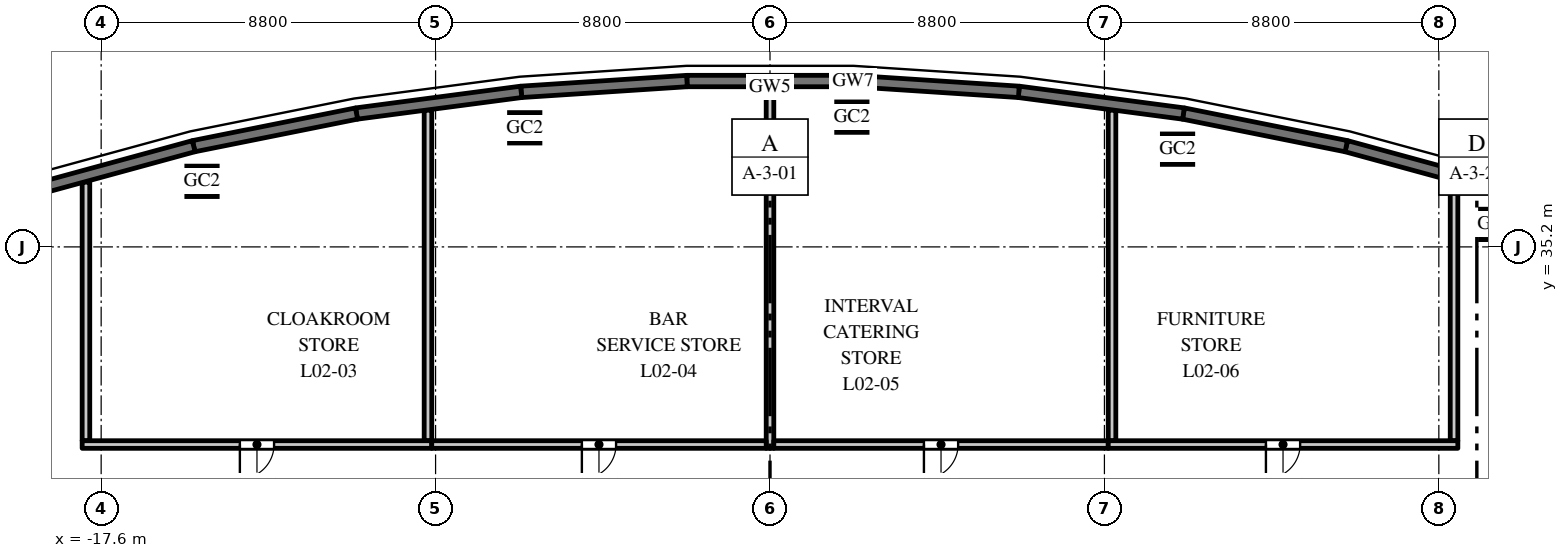
"""IFC4 building model, lengths in metres.
Left out: names, types, materials, properties, quantities, classifications, styles, units other than length and angle.
Written with IfcOpenShell. Run it as: python <this file> out.ifc"""

import sys

from ifc_helpers import new_model, si_unit, direction, frame, frame_2d, origin, origin_2d, place, context, subcontext, project, spatial, rectangle, hollow_rectangle, extrude, element, fill, save


model = new_model("IFC4")
c1 = context("Model", 3, precision=1e-05, world=origin(), true_north=direction((0.0, 1.0)))
c2 = subcontext(c1, "Body", "Model", "MODEL_VIEW")
j1 = project(units=[si_unit("LENGTHUNIT", "METRE"), si_unit("PLANEANGLEUNIT", "RADIAN")], contexts=[c1])
p1 = place(None, origin())
s1 = spatial("IfcSite", under=j1, at=p1, CompositionType="ELEMENT")
p2 = place(p1, origin())
s2 = spatial("IfcBuilding", under=s1, at=p2, CompositionType="ELEMENT")
p3 = place(p2, frame((0.0, 0.0, 13.5)))
s3 = spatial("IfcBuildingStorey", under=s2, at=p3, CompositionType="ELEMENT", Elevation=13.5)
for number, where, z_axis, x_axis in (
    (1, (19.097, 35.792, 0.0), (0.0, 0.0, 1.0), (1.0, 0.0, 0.0)),
    (2, (10.725, 37.771, 0.0), (0.0, 0.0, 1.0), (1.0, 0.0, 0.0)),
    (3, (2.155, 38.614, 0.0), (0.0, 0.0, 1.0), (1.0, 0.0, 0.0)),
    (4, (-6.454, 38.333, 0.0), (0.0, 0.0, 1.0), (1.0, 0.0, 0.0)),
    (5, (-14.946, 36.925, 0.0), (0.0, 0.0, 1.0), (1.0, 0.0, 0.0)),
):
    element("IfcColumn", number, at=place(p3, frame(where, z_axis=z_axis, x_axis=x_axis)), inside=s3, PredefinedType="COLUMN", context=c2, shape_type="SweptSolid", body=[
        extrude(hollow_rectangle(XDim=0.8, YDim=0.8, WallThickness=0.04, at=origin_2d()), origin(), (0.0, 0.0, 1.0), 6.0),
    ])
p4 = place(p3, frame((-9.0, 38.799, 0.0), z_axis=(0.0, 0.0, 1.0), x_axis=(0.0, -1.0, 0.0)))
e6 = element("IfcWall", 6, at=p4, inside=s3, PredefinedType="PARTITIONING", context=c2, shape_type="SweptSolid", body=[
    extrude(rectangle(XDim=8.699, YDim=0.2, at=frame_2d((4.35, 0.0))), origin(), (0.0, 0.0, 1.0), 5.15),
])
p5 = place(p3, frame((-18.0, 30.1, 0.0), z_axis=(0.0, 0.0, 1.0), x_axis=(0.0, 1.0, 0.0)))
e7 = element("IfcWall", 7, at=p5, inside=s3, PredefinedType="PARTITIONING", context=c2, shape_type="SweptSolid", body=[
    extrude(rectangle(XDim=6.803, YDim=0.2, at=frame_2d((3.402, 0.0))), origin(), (0.0, 0.0, 1.0), 5.15),
])
p6 = place(p3, frame((-8.9, 30.0, 0.0), z_axis=(0.0, 0.0, 1.0), x_axis=(-1.0, 0.0, 0.0)))
e8 = element("IfcWall", 8, at=p6, inside=s3, PredefinedType="PARTITIONING", context=c2, shape_type="SweptSolid", body=[
    extrude(rectangle(XDim=9.2, YDim=0.2, at=frame_2d((4.6, 0.0))), origin(), (0.0, 0.0, 1.0), 4.75),
])
p7 = place(p6, frame((4.15, 0.0, 0.0)))
e9 = element("IfcOpeningElement", 9, at=p7, cuts=e8, PredefinedType="OPENING", context=c2, shape_type="SweptSolid", body=[
    extrude(rectangle(XDim=0.9, YDim=2.1, at=frame_2d((0.45, 1.05))), frame((0.0, 0.11, 0.0), z_axis=(0.0, -1.0, 0.0), x_axis=(1.0, 0.0, 0.0)), (0.0, 0.0, 1.0), 0.22),
])
p8 = place(p3, frame((0.0, 39.414, 0.0), z_axis=(0.0, 0.0, 1.0), x_axis=(0.0, -1.0, 0.0)))
e10 = element("IfcWall", 10, at=p8, inside=s3, PredefinedType="PARTITIONING", context=c2, shape_type="SweptSolid", body=[
    extrude(rectangle(XDim=9.514, YDim=0.2, at=frame_2d((4.757, 0.0))), origin(), (0.0, 0.0, 1.0), 5.15),
])
p9 = place(p3, frame((-0.1, 30.0, 0.0), z_axis=(0.0, 0.0, 1.0), x_axis=(-1.0, 0.0, 0.0)))
e11 = element("IfcWall", 11, at=p9, inside=s3, PredefinedType="PARTITIONING", context=c2, shape_type="SweptSolid", body=[
    extrude(rectangle(XDim=8.801, YDim=0.2, at=frame_2d((4.4, 0.0))), origin(), (0.0, 0.0, 1.0), 4.75),
])
p10 = place(p9, frame((3.95, 0.0, 0.0)))
e12 = element("IfcOpeningElement", 12, at=p10, cuts=e11, PredefinedType="OPENING", context=c2, shape_type="SweptSolid", body=[
    extrude(rectangle(XDim=0.9, YDim=2.1, at=frame_2d((0.45, 1.05))), frame((0.0, 0.11, 0.0), z_axis=(0.0, -1.0, 0.0), x_axis=(1.0, 0.0, 0.0)), (0.0, 0.0, 1.0), 0.22),
])
p11 = place(p3, frame((9.0, 38.799, 0.0), z_axis=(0.0, 0.0, 1.0), x_axis=(0.0, -1.0, 0.0)))
e13 = element("IfcWall", 13, at=p11, inside=s3, PredefinedType="PARTITIONING", context=c2, shape_type="SweptSolid", body=[
    extrude(rectangle(XDim=8.699, YDim=0.2, at=frame_2d((4.35, 0.0))), origin(), (0.0, 0.0, 1.0), 4.75),
])
p12 = place(p3, frame((8.901, 30.0, 0.0), z_axis=(0.0, 0.0, 1.0), x_axis=(-1.0, 0.0, 0.0)))
e14 = element("IfcWall", 14, at=p12, inside=s3, PredefinedType="PARTITIONING", context=c2, shape_type="SweptSolid", body=[
    extrude(rectangle(XDim=8.801, YDim=0.2, at=frame_2d((4.4, 0.0))), origin(), (0.0, 0.0, 1.0), 4.75),
])
p13 = place(p12, frame((3.95, 0.0, 0.0)))
e15 = element("IfcOpeningElement", 15, at=p13, cuts=e14, PredefinedType="OPENING", context=c2, shape_type="SweptSolid", body=[
    extrude(rectangle(XDim=0.9, YDim=2.1, at=frame_2d((0.45, 1.05))), frame((0.0, 0.11, 0.0), z_axis=(0.0, -1.0, 0.0), x_axis=(1.0, 0.0, 0.0)), (0.0, 0.0, 1.0), 0.22),
])
p14 = place(p3, frame((18.0, 36.904, 0.0), z_axis=(0.0, 0.0, 1.0), x_axis=(0.0, -1.0, 0.0)))
e16 = element("IfcWall", 16, at=p14, inside=s3, PredefinedType="PARTITIONING", context=c2, shape_type="SweptSolid", body=[
    extrude(rectangle(XDim=6.803, YDim=0.2, at=frame_2d((3.402, 0.0))), origin(), (0.0, 0.0, 1.0), 4.75),
])
p15 = place(p3, frame((18.1, 30.0, 0.0), z_axis=(0.0, 0.0, 1.0), x_axis=(-1.0, 0.0, 0.0)))
e17 = element("IfcWall", 17, at=p15, inside=s3, PredefinedType="PARTITIONING", context=c2, shape_type="SweptSolid", body=[
    extrude(rectangle(XDim=9.2, YDim=0.2, at=frame_2d((4.6, 0.0))), origin(), (0.0, 0.0, 1.0), 4.75),
])
p16 = place(p15, frame((4.15, 0.0, 0.0)))
e18 = element("IfcOpeningElement", 18, at=p16, cuts=e17, PredefinedType="OPENING", context=c2, shape_type="SweptSolid", body=[
    extrude(rectangle(XDim=0.9, YDim=2.1, at=frame_2d((0.45, 1.05))), frame((0.0, 0.11, 0.0), z_axis=(0.0, -1.0, 0.0), x_axis=(1.0, 0.0, 0.0)), (0.0, 0.0, 1.0), 0.22),
])
p17 = place(p3, frame((19.379, 36.699, 0.0), z_axis=(0.0, 0.0, 1.0), x_axis=(-0.964679950239, 0.263424739931, 0.0)))
e19 = element("IfcWall", 19, at=p17, inside=s3, PredefinedType="SOLIDWALL", context=c2, shape_type="SweptSolid", body=[
    extrude(rectangle(XDim=4.369, YDim=0.3, at=frame_2d((2.185, 0.0))), origin(), (0.0, 0.0, 1.0), 5.75),
])
p18 = place(p17, frame((1.594, 0.0, 1.0)))
e20 = element("IfcOpeningElement", 20, at=p18, cuts=e19, PredefinedType="OPENING", context=c2, shape_type="SweptSolid", body=[
    extrude(rectangle(XDim=2.4, YDim=3.0, at=frame_2d((1.2, 1.5))), frame((0.0, 0.16, 0.0), z_axis=(0.0, -1.0, 0.0), x_axis=(1.0, 0.0, 0.0)), (0.0, 0.0, 1.0), 0.32),
])
p19 = place(p3, frame((15.165, 37.85, 0.0), z_axis=(0.0, 0.0, 1.0), x_axis=(-0.980494629762, 0.196545875071, 0.0)))
e21 = element("IfcWall", 21, at=p19, inside=s3, PredefinedType="SOLIDWALL", context=c2, shape_type="SweptSolid", body=[
    extrude(rectangle(XDim=4.37, YDim=0.3, at=frame_2d((2.185, 0.0))), origin(), (0.0, 0.0, 1.0), 5.75),
])
p20 = place(p19, frame((0.985, 0.0, 1.0)))
e22 = element("IfcOpeningElement", 22, at=p20, cuts=e21, PredefinedType="OPENING", context=c2, shape_type="SweptSolid", body=[
    extrude(rectangle(XDim=2.4, YDim=3.0, at=frame_2d((1.2, 1.5))), frame((0.0, 0.16, 0.0), z_axis=(0.0, -1.0, 0.0), x_axis=(1.0, 0.0, 0.0)), (0.0, 0.0, 1.0), 0.32),
])
p21 = place(p3, frame((10.88, 38.709, 0.0), z_axis=(0.0, 0.0, 1.0), x_axis=(-0.991441741932, 0.130549884544, 0.0)))
e23 = element("IfcWall", 23, at=p21, inside=s3, PredefinedType="SOLIDWALL", context=c2, shape_type="SweptSolid", body=[
    extrude(rectangle(XDim=4.37, YDim=0.3, at=frame_2d((2.185, 0.0))), origin(), (0.0, 0.0, 1.0), 5.75),
])
p22 = place(p21, frame((0.985, 0.0, 1.0)))
e24 = element("IfcOpeningElement", 24, at=p22, cuts=e23, PredefinedType="OPENING", context=c2, shape_type="SweptSolid", body=[
    extrude(rectangle(XDim=2.4, YDim=3.0, at=frame_2d((1.2, 1.5))), frame((0.0, 0.16, 0.0), z_axis=(0.0, -1.0, 0.0), x_axis=(1.0, 0.0, 0.0)), (0.0, 0.0, 1.0), 0.32),
])
p23 = place(p3, frame((6.547, 39.28, 0.0), z_axis=(0.0, 0.0, 1.0), x_axis=(-0.997876871627, 0.065128711577, 0.0)))
e25 = element("IfcWall", 25, at=p23, inside=s3, PredefinedType="SOLIDWALL", context=c2, shape_type="SweptSolid", body=[
    extrude(rectangle(XDim=4.371, YDim=0.3, at=frame_2d((2.186, 0.0))), origin(), (0.0, 0.0, 1.0), 5.75),
])
p24 = place(p23, frame((0.985, 0.0, 1.0)))
e26 = element("IfcOpeningElement", 26, at=p24, cuts=e25, PredefinedType="OPENING", context=c2, shape_type="SweptSolid", body=[
    extrude(rectangle(XDim=2.4, YDim=3.0, at=frame_2d((1.2, 1.5))), frame((0.0, 0.16, 0.0), z_axis=(0.0, -1.0, 0.0), x_axis=(1.0, 0.0, 0.0)), (0.0, 0.0, 1.0), 0.32),
])
p25 = place(p3, frame((2.186, 39.564, 0.0), z_axis=(0.0, 0.0, 1.0), x_axis=(-1.0, 0.0, 0.0)))
e27 = element("IfcWall", 27, at=p25, inside=s3, PredefinedType="SOLIDWALL", context=c2, shape_type="SweptSolid", body=[
    extrude(rectangle(XDim=4.371, YDim=0.3, at=frame_2d((2.186, 0.0))), origin(), (0.0, 0.0, 1.0), 5.75),
])
p26 = place(p25, frame((0.986, 0.0, 1.0)))
e28 = element("IfcOpeningElement", 28, at=p26, cuts=e27, PredefinedType="OPENING", context=c2, shape_type="SweptSolid", body=[
    extrude(rectangle(XDim=2.4, YDim=3.0, at=frame_2d((1.2, 1.5))), frame((0.0, 0.16, 0.0), z_axis=(0.0, -1.0, 0.0), x_axis=(1.0, 0.0, 0.0)), (0.0, 0.0, 1.0), 0.32),
])
p27 = place(p3, frame((-2.186, 39.564, 0.0), z_axis=(0.0, 0.0, 1.0), x_axis=(-0.997876871627, -0.065128711577, 0.0)))
e29 = element("IfcWall", 29, at=p27, inside=s3, PredefinedType="SOLIDWALL", context=c2, shape_type="SweptSolid", body=[
    extrude(rectangle(XDim=4.371, YDim=0.3, at=frame_2d((2.186, 0.0))), origin(), (0.0, 0.0, 1.0), 5.75),
])
p28 = place(p27, frame((0.985, 0.0, 1.0)))
e30 = element("IfcOpeningElement", 30, at=p28, cuts=e29, PredefinedType="OPENING", context=c2, shape_type="SweptSolid", body=[
    extrude(rectangle(XDim=2.4, YDim=3.0, at=frame_2d((1.2, 1.5))), frame((0.0, 0.16, 0.0), z_axis=(0.0, -1.0, 0.0), x_axis=(1.0, 0.0, 0.0)), (0.0, 0.0, 1.0), 0.32),
])
p29 = place(p3, frame((-6.547, 39.28, 0.0), z_axis=(0.0, 0.0, 1.0), x_axis=(-0.991441741932, -0.130549884544, 0.0)))
e31 = element("IfcWall", 31, at=p29, inside=s3, PredefinedType="SOLIDWALL", context=c2, shape_type="SweptSolid", body=[
    extrude(rectangle(XDim=4.37, YDim=0.3, at=frame_2d((2.185, 0.0))), origin(), (0.0, 0.0, 1.0), 5.75),
])
p30 = place(p29, frame((0.985, 0.0, 1.0)))
e32 = element("IfcOpeningElement", 32, at=p30, cuts=e31, PredefinedType="OPENING", context=c2, shape_type="SweptSolid", body=[
    extrude(rectangle(XDim=2.4, YDim=3.0, at=frame_2d((1.2, 1.5))), frame((0.0, 0.16, 0.0), z_axis=(0.0, -1.0, 0.0), x_axis=(1.0, 0.0, 0.0)), (0.0, 0.0, 1.0), 0.32),
])
p31 = place(p3, frame((-10.88, 38.709, 0.0), z_axis=(0.0, 0.0, 1.0), x_axis=(-0.980494629762, -0.196545875071, 0.0)))
e33 = element("IfcWall", 33, at=p31, inside=s3, PredefinedType="SOLIDWALL", context=c2, shape_type="SweptSolid", body=[
    extrude(rectangle(XDim=4.37, YDim=0.3, at=frame_2d((2.185, 0.0))), origin(), (0.0, 0.0, 1.0), 5.75),
])
p32 = place(p31, frame((0.985, 0.0, 1.0)))
e34 = element("IfcOpeningElement", 34, at=p32, cuts=e33, PredefinedType="OPENING", context=c2, shape_type="SweptSolid", body=[
    extrude(rectangle(XDim=2.4, YDim=3.0, at=frame_2d((1.2, 1.5))), frame((0.0, 0.16, 0.0), z_axis=(0.0, -1.0, 0.0), x_axis=(1.0, 0.0, 0.0)), (0.0, 0.0, 1.0), 0.32),
])
p33 = place(p3, frame((-15.165, 37.85, 0.0), z_axis=(0.0, 0.0, 1.0), x_axis=(-0.964679950239, -0.263424739931, 0.0)))
e35 = element("IfcWall", 35, at=p33, inside=s3, PredefinedType="SOLIDWALL", context=c2, shape_type="SweptSolid", body=[
    extrude(rectangle(XDim=4.369, YDim=0.3, at=frame_2d((2.185, 0.0))), origin(), (0.0, 0.0, 1.0), 5.75),
])
p34 = place(p33, frame((0.375, 0.0, 1.0)))
e36 = element("IfcOpeningElement", 36, at=p34, cuts=e35, PredefinedType="OPENING", context=c2, shape_type="SweptSolid", body=[
    extrude(rectangle(XDim=2.4, YDim=3.0, at=frame_2d((1.2, 1.5))), frame((0.0, 0.16, 0.0), z_axis=(0.0, -1.0, 0.0), x_axis=(1.0, 0.0, 0.0)), (0.0, 0.0, 1.0), 0.32),
])
p35 = place(p7, origin())
e37 = element("IfcDoor", 37, at=p35, inside=s3, OperationType="SINGLE_SWING_RIGHT", PredefinedType="DOOR", context=c2, shape_type="SweptSolid", body=[
    extrude(rectangle(XDim=0.9, YDim=2.1, at=frame_2d((0.45, 1.05))), frame((0.0, 0.025, 0.0), z_axis=(0.0, -1.0, 0.0), x_axis=(1.0, 0.0, 0.0)), (0.0, 0.0, 1.0), 0.05),
])
fill(e9, e37)
p36 = place(p10, origin())
e38 = element("IfcDoor", 38, at=p36, inside=s3, OperationType="SINGLE_SWING_RIGHT", PredefinedType="DOOR", context=c2, shape_type="SweptSolid", body=[
    extrude(rectangle(XDim=0.9, YDim=2.1, at=frame_2d((0.45, 1.05))), frame((0.0, 0.025, 0.0), z_axis=(0.0, -1.0, 0.0), x_axis=(1.0, 0.0, 0.0)), (0.0, 0.0, 1.0), 0.05),
])
fill(e12, e38)
p37 = place(p13, origin())
e39 = element("IfcDoor", 39, at=p37, inside=s3, OperationType="SINGLE_SWING_RIGHT", PredefinedType="DOOR", context=c2, shape_type="SweptSolid", body=[
    extrude(rectangle(XDim=0.9, YDim=2.1, at=frame_2d((0.45, 1.05))), frame((0.0, 0.025, 0.0), z_axis=(0.0, -1.0, 0.0), x_axis=(1.0, 0.0, 0.0)), (0.0, 0.0, 1.0), 0.05),
])
fill(e15, e39)
p38 = place(p16, origin())
e40 = element("IfcDoor", 40, at=p38, inside=s3, OperationType="SINGLE_SWING_RIGHT", PredefinedType="DOOR", context=c2, shape_type="SweptSolid", body=[
    extrude(rectangle(XDim=0.9, YDim=2.1, at=frame_2d((0.45, 1.05))), frame((0.0, 0.025, 0.0), z_axis=(0.0, -1.0, 0.0), x_axis=(1.0, 0.0, 0.0)), (0.0, 0.0, 1.0), 0.05),
])
fill(e18, e40)
p39 = place(p18, origin())
e41 = element("IfcWindow", 41, at=p39, inside=s3, PartitioningType="SINGLE_PANEL", PredefinedType="WINDOW", context=c2, shape_type="SweptSolid", body=[
    extrude(rectangle(XDim=2.4, YDim=3.0, at=frame_2d((1.2, 1.5))), frame((0.0, 0.03, 0.0), z_axis=(0.0, -1.0, 0.0), x_axis=(1.0, 0.0, 0.0)), (0.0, 0.0, 1.0), 0.06),
])
fill(e20, e41)
p40 = place(p20, origin())
e42 = element("IfcWindow", 42, at=p40, inside=s3, PartitioningType="SINGLE_PANEL", PredefinedType="WINDOW", context=c2, shape_type="SweptSolid", body=[
    extrude(rectangle(XDim=2.4, YDim=3.0, at=frame_2d((1.2, 1.5))), frame((0.0, 0.03, 0.0), z_axis=(0.0, -1.0, 0.0), x_axis=(1.0, 0.0, 0.0)), (0.0, 0.0, 1.0), 0.06),
])
fill(e22, e42)
p41 = place(p22, origin())
e43 = element("IfcWindow", 43, at=p41, inside=s3, PartitioningType="SINGLE_PANEL", PredefinedType="WINDOW", context=c2, shape_type="SweptSolid", body=[
    extrude(rectangle(XDim=2.4, YDim=3.0, at=frame_2d((1.2, 1.5))), frame((0.0, 0.03, 0.0), z_axis=(0.0, -1.0, 0.0), x_axis=(1.0, 0.0, 0.0)), (0.0, 0.0, 1.0), 0.06),
])
fill(e24, e43)
p42 = place(p24, origin())
e44 = element("IfcWindow", 44, at=p42, inside=s3, PartitioningType="SINGLE_PANEL", PredefinedType="WINDOW", context=c2, shape_type="SweptSolid", body=[
    extrude(rectangle(XDim=2.4, YDim=3.0, at=frame_2d((1.2, 1.5))), frame((0.0, 0.03, 0.0), z_axis=(0.0, -1.0, 0.0), x_axis=(1.0, 0.0, 0.0)), (0.0, 0.0, 1.0), 0.06),
])
fill(e26, e44)
p43 = place(p26, origin())
e45 = element("IfcWindow", 45, at=p43, inside=s3, PartitioningType="SINGLE_PANEL", PredefinedType="WINDOW", context=c2, shape_type="SweptSolid", body=[
    extrude(rectangle(XDim=2.4, YDim=3.0, at=frame_2d((1.2, 1.5))), frame((0.0, 0.03, 0.0), z_axis=(0.0, -1.0, 0.0), x_axis=(1.0, 0.0, 0.0)), (0.0, 0.0, 1.0), 0.06),
])
fill(e28, e45)
p44 = place(p28, origin())
e46 = element("IfcWindow", 46, at=p44, inside=s3, PartitioningType="SINGLE_PANEL", PredefinedType="WINDOW", context=c2, shape_type="SweptSolid", body=[
    extrude(rectangle(XDim=2.4, YDim=3.0, at=frame_2d((1.2, 1.5))), frame((0.0, 0.03, 0.0), z_axis=(0.0, -1.0, 0.0), x_axis=(1.0, 0.0, 0.0)), (0.0, 0.0, 1.0), 0.06),
])
fill(e30, e46)
p45 = place(p30, origin())
e47 = element("IfcWindow", 47, at=p45, inside=s3, PartitioningType="SINGLE_PANEL", PredefinedType="WINDOW", context=c2, shape_type="SweptSolid", body=[
    extrude(rectangle(XDim=2.4, YDim=3.0, at=frame_2d((1.2, 1.5))), frame((0.0, 0.03, 0.0), z_axis=(0.0, -1.0, 0.0), x_axis=(1.0, 0.0, 0.0)), (0.0, 0.0, 1.0), 0.06),
])
fill(e32, e47)
p46 = place(p32, origin())
e48 = element("IfcWindow", 48, at=p46, inside=s3, PartitioningType="SINGLE_PANEL", PredefinedType="WINDOW", context=c2, shape_type="SweptSolid", body=[
    extrude(rectangle(XDim=2.4, YDim=3.0, at=frame_2d((1.2, 1.5))), frame((0.0, 0.03, 0.0), z_axis=(0.0, -1.0, 0.0), x_axis=(1.0, 0.0, 0.0)), (0.0, 0.0, 1.0), 0.06),
])
fill(e34, e48)
p47 = place(p34, origin())
e49 = element("IfcWindow", 49, at=p47, inside=s3, PartitioningType="SINGLE_PANEL", PredefinedType="WINDOW", context=c2, shape_type="SweptSolid", body=[
    extrude(rectangle(XDim=2.4, YDim=3.0, at=frame_2d((1.2, 1.5))), frame((0.0, 0.03, 0.0), z_axis=(0.0, -1.0, 0.0), x_axis=(1.0, 0.0, 0.0)), (0.0, 0.0, 1.0), 0.06),
])
fill(e36, e49)
save(model, sys.argv[1])
